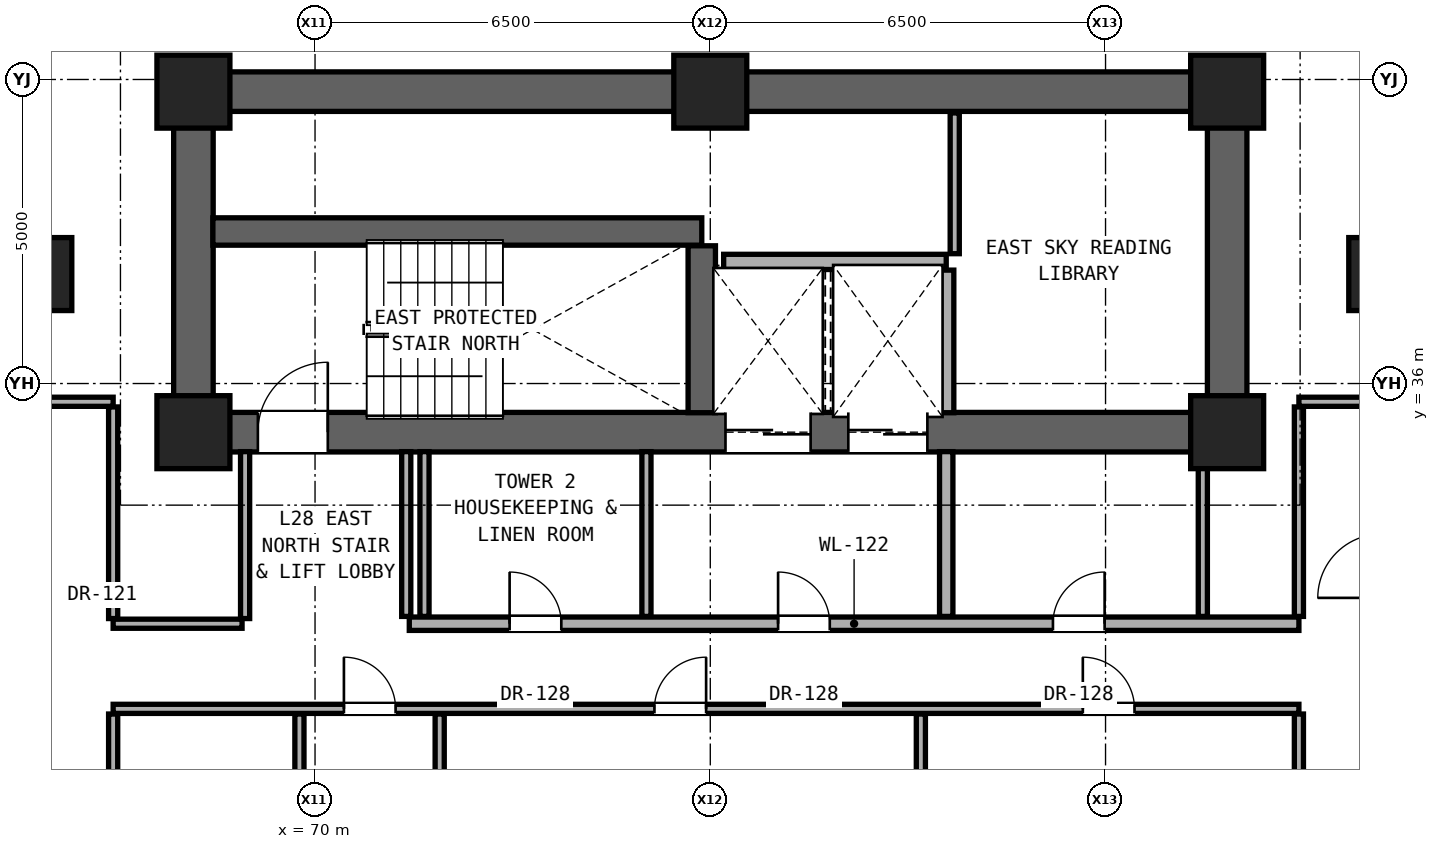
"""IFC4 building model, lengths in metres.
Left out: names, types, materials, properties, quantities, classifications, styles, units other than length and angle.
Written with IfcOpenShell. Run it as: python <this file> out.ifc"""

import sys

from ifc_helpers import new_model, si_unit, direction, frame, frame_2d, origin, origin_2d, place, context, subcontext, project, spatial, rectangle, extrude, element, fill, save


model = new_model("IFC4")
c1 = context("Model", 3, precision=1e-05, world=origin(), true_north=direction((0.0, 1.0)))
c2 = subcontext(c1, "Body", "Model", "MODEL_VIEW")
j1 = project(units=[si_unit("LENGTHUNIT", "METRE"), si_unit("PLANEANGLEUNIT", "RADIAN")], contexts=[c1])
p1 = place(None, origin())
s1 = spatial("IfcSite", under=j1, at=p1, CompositionType="ELEMENT")
p2 = place(p1, origin())
s2 = spatial("IfcBuilding", under=s1, at=p2, CompositionType="ELEMENT")
p3 = place(p2, frame((0.0, 0.0, 101.6)))
s3 = spatial("IfcBuildingStorey", under=s2, at=p3, CompositionType="ELEMENT", Elevation=101.6)
for number, where, z_axis, x_axis in (
    (1, (68.0, 35.2, 0.0), (0.0, 0.0, 1.0), (1.0, 0.0, 0.0)),
    (2, (85.0, 35.2, 0.0), (0.0, 0.0, 1.0), (1.0, 0.0, 0.0)),
    (3, (68.0, 40.8, 0.0), (0.0, 0.0, 1.0), (1.0, 0.0, 0.0)),
    (4, (76.5, 40.8, 0.0), (0.0, 0.0, 1.0), (1.0, 0.0, 0.0)),
    (5, (85.0, 40.8, 0.0), (0.0, 0.0, 1.0), (1.0, 0.0, 0.0)),
):
    element("IfcColumn", number, at=place(p3, frame(where, z_axis=z_axis, x_axis=x_axis)), inside=s3, PredefinedType="COLUMN", context=c2, shape_type="SweptSolid", body=[
        extrude(rectangle(XDim=1.2, YDim=1.2, at=origin_2d()), origin(), (0.0, 0.0, 1.0), 3.3),
    ])
for number, where, z_axis, x_axis in (
    (6, (65.6, 37.8, 0.0), (0.0, 0.0, 1.0), (1.0, 0.0, 0.0)),
    (7, (87.4, 37.8, 0.0), (0.0, 0.0, 1.0), (1.0, 0.0, 0.0)),
):
    element("IfcColumn", number, at=place(p3, frame(where, z_axis=z_axis, x_axis=x_axis)), inside=s3, PredefinedType="PILASTER", context=c2, shape_type="SweptSolid", body=[
        extrude(rectangle(XDim=0.8, YDim=1.2, at=origin_2d()), origin(), (0.0, 0.0, 1.0), 3.3),
    ])
p4 = place(p3, frame((68.0, 40.8, 0.0), z_axis=(0.0, 0.0, 1.0), x_axis=(1.0, 0.0, 0.0)))
e8 = element("IfcWall", 8, at=p4, inside=s3, PredefinedType="SHEAR", context=c2, shape_type="SweptSolid", body=[
    extrude(rectangle(XDim=17.0, YDim=0.65, at=frame_2d((8.5, 0.0))), origin(), (0.0, 0.0, 1.0), 3.08),
])
for number, where, z_axis, x_axis in (
    (9, (68.0, 35.2, 0.0), (0.0, 0.0, 1.0), (0.0, 1.0, 0.0)),
    (10, (85.0, 35.2, 0.0), (0.0, 0.0, 1.0), (0.0, 1.0, 0.0)),
):
    element("IfcWall", number, at=place(p3, frame(where, z_axis=z_axis, x_axis=x_axis)), inside=s3, PredefinedType="SHEAR", context=c2, shape_type="SweptSolid", body=[
        extrude(rectangle(XDim=5.6, YDim=0.65, at=frame_2d((2.8, 0.0))), origin(), (0.0, 0.0, 1.0), 3.08),
    ])
p5 = place(p3, frame((68.0, 35.2, 0.0), z_axis=(0.0, 0.0, 1.0), x_axis=(1.0, 0.0, 0.0)))
e11 = element("IfcWall", 11, at=p5, inside=s3, PredefinedType="SHEAR", context=c2, shape_type="SweptSolid", body=[
    extrude(rectangle(XDim=17.0, YDim=0.65, at=frame_2d((8.5, 0.0))), origin(), (0.0, 0.0, 1.0), 3.08),
])
p6 = place(p5, frame((1.06, 0.0, 0.0)))
e12 = element("IfcOpeningElement", 12, at=p6, cuts=e11, PredefinedType="OPENING", context=c2, shape_type="SweptSolid", body=[
    extrude(rectangle(XDim=1.15, YDim=2.2, at=frame_2d((0.575, 1.1))), frame((0.0, 0.335, 0.0), z_axis=(0.0, -1.0, 0.0), x_axis=(1.0, 0.0, 0.0)), (0.0, 0.0, 1.0), 0.67),
])
p7 = place(p5, frame((8.75, 0.0, 0.0)))
e13 = element("IfcOpeningElement", 13, at=p7, cuts=e11, PredefinedType="OPENING", context=c2, shape_type="SweptSolid", body=[
    extrude(rectangle(XDim=1.4, YDim=2.35, at=frame_2d((0.7, 1.175))), frame((0.0, 0.335, 0.0), z_axis=(0.0, -1.0, 0.0), x_axis=(1.0, 0.0, 0.0)), (0.0, 0.0, 1.0), 0.67),
])
p8 = place(p5, frame((10.77, 0.0, 0.0)))
e14 = element("IfcOpeningElement", 14, at=p8, cuts=e11, PredefinedType="OPENING", context=c2, shape_type="SweptSolid", body=[
    extrude(rectangle(XDim=1.3, YDim=2.3, at=frame_2d((0.65, 1.15))), frame((0.0, 0.335, 0.0), z_axis=(0.0, -1.0, 0.0), x_axis=(1.0, 0.0, 0.0)), (0.0, 0.0, 1.0), 0.67),
])
p9 = place(p3, frame((66.68, 30.65, 0.0), z_axis=(0.0, 0.0, 1.0), x_axis=(1.0, 0.0, 0.0)))
e15 = element("IfcWall", 15, at=p9, inside=s3, PredefinedType="PARTITIONING", context=c2, shape_type="SweptSolid", body=[
    extrude(rectangle(XDim=19.5, YDim=0.15, at=frame_2d((9.75, 0.0))), origin(), (0.0, 0.0, 1.0), 2.145),
])
p10 = place(p9, frame((3.795, 0.0, 0.0)))
e16 = element("IfcOpeningElement", 16, at=p10, cuts=e15, PredefinedType="OPENING", context=c2, shape_type="SweptSolid", body=[
    extrude(rectangle(XDim=0.85, YDim=2.01, at=frame_2d((0.425, 1.005))), frame((0.0, 0.085, 0.0), z_axis=(0.0, -1.0, 0.0), x_axis=(1.0, 0.0, 0.0)), (0.0, 0.0, 1.0), 0.17),
])
p11 = place(p9, frame((8.902, 0.0, 0.0)))
e17 = element("IfcOpeningElement", 17, at=p11, cuts=e15, PredefinedType="OPENING", context=c2, shape_type="SweptSolid", body=[
    extrude(rectangle(XDim=0.85, YDim=2.01, at=frame_2d((0.425, 1.005))), frame((0.0, 0.085, 0.0), z_axis=(0.0, -1.0, 0.0), x_axis=(1.0, 0.0, 0.0)), (0.0, 0.0, 1.0), 0.17),
])
p12 = place(p9, frame((15.947, 0.0, 0.0)))
e18 = element("IfcOpeningElement", 18, at=p12, cuts=e15, PredefinedType="OPENING", context=c2, shape_type="SweptSolid", body=[
    extrude(rectangle(XDim=0.85, YDim=2.01, at=frame_2d((0.425, 1.005))), frame((0.0, 0.085, 0.0), z_axis=(0.0, -1.0, 0.0), x_axis=(1.0, 0.0, 0.0)), (0.0, 0.0, 1.0), 0.17),
])
p13 = place(p3, frame((66.68, 32.05, 0.0), z_axis=(0.0, 0.0, 1.0), x_axis=(1.0, 0.0, 0.0)))
e19 = element("IfcWall", 19, at=p13, inside=s3, PredefinedType="PARTITIONING", context=c2, shape_type="SweptSolid", body=[
    extrude(rectangle(XDim=2.12, YDim=0.15, at=frame_2d((1.06, 0.0))), origin(), (0.0, 0.0, 1.0), 2.145),
])
p14 = place(p3, frame((71.55, 32.05, 0.0), z_axis=(0.0, 0.0, 1.0), x_axis=(1.0, 0.0, 0.0)))
e20 = element("IfcWall", 20, at=p14, inside=s3, PredefinedType="SOLIDWALL", context=c2, shape_type="SweptSolid", body=[
    extrude(rectangle(XDim=14.63, YDim=0.22, at=frame_2d((7.315, 0.0))), origin(), (0.0, 0.0, 1.0), 2.145),
])
p15 = place(p14, frame((6.065, 0.0, 0.0)))
e21 = element("IfcOpeningElement", 21, at=p15, cuts=e20, PredefinedType="OPENING", context=c2, shape_type="SweptSolid", body=[
    extrude(rectangle(XDim=0.85, YDim=2.01, at=frame_2d((0.425, 1.005))), frame((0.0, 0.12, 0.0), z_axis=(0.0, -1.0, 0.0), x_axis=(1.0, 0.0, 0.0)), (0.0, 0.0, 1.0), 0.24),
])
p16 = place(p14, frame((10.585, 0.0, 0.0)))
e22 = element("IfcOpeningElement", 22, at=p16, cuts=e20, PredefinedType="OPENING", context=c2, shape_type="SweptSolid", body=[
    extrude(rectangle(XDim=0.85, YDim=2.01, at=frame_2d((0.425, 1.005))), frame((0.0, 0.12, 0.0), z_axis=(0.0, -1.0, 0.0), x_axis=(1.0, 0.0, 0.0)), (0.0, 0.0, 1.0), 0.24),
])
p17 = place(p14, frame((1.65, 0.0, 0.0)))
e23 = element("IfcOpeningElement", 23, at=p17, cuts=e20, PredefinedType="OPENING", context=c2, shape_type="SweptSolid", body=[
    extrude(rectangle(XDim=0.85, YDim=2.01, at=frame_2d((0.425, 1.005))), frame((0.0, 0.12, 0.0), z_axis=(0.0, -1.0, 0.0), x_axis=(1.0, 0.0, 0.0)), (0.0, 0.0, 1.0), 0.24),
])
p18 = place(p3, frame((65.32, 35.7, 0.0), z_axis=(0.0, 0.0, 1.0), x_axis=(1.0, 0.0, 0.0)))
e24 = element("IfcWall", 24, at=p18, inside=s3, PredefinedType="PARTITIONING", context=c2, shape_type="SweptSolid", body=[
    extrude(rectangle(XDim=1.36, YDim=0.15, at=frame_2d((0.68, 0.0))), origin(), (0.0, 0.0, 1.0), 3.08),
])
p19 = place(p3, frame((86.18, 35.7, 0.0), z_axis=(0.0, 0.0, 1.0), x_axis=(1.0, 0.0, 0.0)))
e25 = element("IfcWall", 25, at=p19, inside=s3, PredefinedType="PARTITIONING", context=c2, shape_type="SweptSolid", body=[
    extrude(rectangle(XDim=1.36, YDim=0.15, at=frame_2d((0.68, 0.0))), origin(), (0.0, 0.0, 1.0), 3.08),
])
p20 = place(p3, frame((76.72, 38.0, 0.0), z_axis=(0.0, 0.0, 1.0), x_axis=(1.0, 0.0, 0.0)))
e26 = element("IfcWall", 26, at=p20, inside=s3, PredefinedType="SOLIDWALL", context=c2, shape_type="SweptSolid", body=[
    extrude(rectangle(XDim=3.66, YDim=0.25, at=frame_2d((1.83, 0.0))), origin(), (0.0, 0.0, 1.0), 3.08),
])
p21 = place(p3, frame((68.32, 38.5, 0.0), z_axis=(0.0, 0.0, 1.0), x_axis=(1.0, 0.0, 0.0)))
e27 = element("IfcWall", 27, at=p21, inside=s3, PredefinedType="SHEAR", context=c2, shape_type="SweptSolid", body=[
    extrude(rectangle(XDim=8.04, YDim=0.45, at=frame_2d((4.02, 0.0))), origin(), (0.0, 0.0, 1.0), 3.08),
])
p22 = place(p3, frame((66.68, 24.935, 0.0), z_axis=(0.0, 0.0, 1.0), x_axis=(0.0, 1.0, 0.0)))
e28 = element("IfcWall", 28, at=p22, inside=s3, PredefinedType="PARTITIONING", context=c2, shape_type="SweptSolid", body=[
    extrude(rectangle(XDim=5.63, YDim=0.15, at=frame_2d((2.815, 0.0))), origin(), (0.0, 0.0, 1.0), 2.299),
])
p23 = place(p22, frame((2.34, 0.0, 0.0)))
e29 = element("IfcOpeningElement", 29, at=p23, cuts=e28, PredefinedType="OPENING", context=c2, shape_type="SweptSolid", body=[
    extrude(rectangle(XDim=0.95, YDim=2.15, at=frame_2d((0.475, 1.075))), frame((0.0, 0.085, 0.0), z_axis=(0.0, -1.0, 0.0), x_axis=(1.0, 0.0, 0.0)), (0.0, 0.0, 1.0), 0.17),
])
p24 = place(p3, frame((66.68, 32.135, 0.0), z_axis=(0.0, 0.0, 1.0), x_axis=(0.0, 1.0, 0.0)))
e30 = element("IfcWall", 30, at=p24, inside=s3, PredefinedType="PARTITIONING", context=c2, shape_type="SweptSolid", body=[
    extrude(rectangle(XDim=3.48, YDim=0.15, at=frame_2d((1.74, 0.0))), origin(), (0.0, 0.0, 1.0), 2.472),
])
p25 = place(p3, frame((68.85, 32.135, 0.0), z_axis=(0.0, 0.0, 1.0), x_axis=(0.0, 1.0, 0.0)))
e31 = element("IfcWall", 31, at=p25, inside=s3, PredefinedType="PARTITIONING", context=c2, shape_type="SweptSolid", body=[
    extrude(rectangle(XDim=2.745, YDim=0.15, at=frame_2d((1.373, 0.0))), origin(), (0.0, 0.0, 1.0), 3.08),
])
p26 = place(p3, frame((69.743, 24.935, 0.0), z_axis=(0.0, 0.0, 1.0), x_axis=(0.0, 1.0, 0.0)))
e32 = element("IfcWall", 32, at=p26, inside=s3, PredefinedType="PARTITIONING", context=c2, shape_type="SweptSolid", body=[
    extrude(rectangle(XDim=5.63, YDim=0.15, at=frame_2d((2.815, 0.0))), origin(), (0.0, 0.0, 1.0), 2.145),
])
for number, where, z_axis, x_axis in (
    (33, (71.5, 32.17, 0.0), (0.0, 0.0, 1.0), (0.0, 1.0, 0.0)),
    (34, (71.8, 32.17, 0.0), (0.0, 0.0, 1.0), (0.0, 1.0, 0.0)),
):
    element("IfcWall", number, at=place(p3, frame(where, z_axis=z_axis, x_axis=x_axis)), inside=s3, PredefinedType="PARTITIONING", context=c2, shape_type="SweptSolid", body=[
        extrude(rectangle(XDim=2.71, YDim=0.15, at=frame_2d((1.355, 0.0))), origin(), (0.0, 0.0, 1.0), 3.08),
    ])
p27 = place(p3, frame((72.05, 26.17, 0.0), z_axis=(0.0, 0.0, 1.0), x_axis=(0.0, 1.0, 0.0)))
e35 = element("IfcWall", 35, at=p27, inside=s3, PredefinedType="PARTITIONING", context=c2, shape_type="SweptSolid", body=[
    extrude(rectangle(XDim=4.395, YDim=0.15, at=frame_2d((2.198, 0.0))), origin(), (0.0, 0.0, 1.0), 2.145),
])
p28 = place(p3, frame((75.45, 32.17, 0.0), z_axis=(0.0, 0.0, 1.0), x_axis=(0.0, 1.0, 0.0)))
e36 = element("IfcWall", 36, at=p28, inside=s3, PredefinedType="PARTITIONING", context=c2, shape_type="SweptSolid", body=[
    extrude(rectangle(XDim=2.71, YDim=0.15, at=frame_2d((1.355, 0.0))), origin(), (0.0, 0.0, 1.0), 3.08),
])
p29 = place(p3, frame((76.36, 35.52, 0.0), z_axis=(0.0, 0.0, 1.0), x_axis=(0.0, 1.0, 0.0)))
e37 = element("IfcWall", 37, at=p29, inside=s3, PredefinedType="SHEAR", context=c2, shape_type="SweptSolid", body=[
    extrude(rectangle(XDim=2.745, YDim=0.45, at=frame_2d((1.373, 0.0))), origin(), (0.0, 0.0, 1.0), 3.08),
])
p30 = place(p3, frame((79.963, 26.17, 0.0), z_axis=(0.0, 0.0, 1.0), x_axis=(0.0, 1.0, 0.0)))
e38 = element("IfcWall", 38, at=p30, inside=s3, PredefinedType="PARTITIONING", context=c2, shape_type="SweptSolid", body=[
    extrude(rectangle(XDim=4.395, YDim=0.15, at=frame_2d((2.198, 0.0))), origin(), (0.0, 0.0, 1.0), 2.145),
])
p31 = place(p3, frame((80.38, 32.17, 0.0), z_axis=(0.0, 0.0, 1.0), x_axis=(0.0, 1.0, 0.0)))
e39 = element("IfcWall", 39, at=p31, inside=s3, PredefinedType="SOLIDWALL", context=c2, shape_type="SweptSolid", body=[
    extrude(rectangle(XDim=2.71, YDim=0.22, at=frame_2d((1.355, 0.0))), origin(), (0.0, 0.0, 1.0), 3.08),
])
p32 = place(p3, frame((80.38, 35.52, 0.0), z_axis=(0.0, 0.0, 1.0), x_axis=(0.0, 1.0, 0.0)))
e40 = element("IfcWall", 40, at=p32, inside=s3, PredefinedType="SOLIDWALL", context=c2, shape_type="SweptSolid", body=[
    extrude(rectangle(XDim=2.345, YDim=0.25, at=frame_2d((1.172, 0.0))), origin(), (0.0, 0.0, 1.0), 3.08),
])
p33 = place(p3, frame((80.52, 38.135, 0.0), z_axis=(0.0, 0.0, 1.0), x_axis=(0.0, 1.0, 0.0)))
e41 = element("IfcWall", 41, at=p33, inside=s3, PredefinedType="PARTITIONING", context=c2, shape_type="SweptSolid", body=[
    extrude(rectangle(XDim=2.315, YDim=0.15, at=frame_2d((1.157, 0.0))), origin(), (0.0, 0.0, 1.0), 3.08),
])
p34 = place(p3, frame((84.6, 32.17, 0.0), z_axis=(0.0, 0.0, 1.0), x_axis=(0.0, 1.0, 0.0)))
e42 = element("IfcWall", 42, at=p34, inside=s3, PredefinedType="PARTITIONING", context=c2, shape_type="SweptSolid", body=[
    extrude(rectangle(XDim=2.71, YDim=0.15, at=frame_2d((1.355, 0.0))), origin(), (0.0, 0.0, 1.0), 3.08),
])
p35 = place(p3, frame((86.18, 26.17, 0.0), z_axis=(0.0, 0.0, 1.0), x_axis=(0.0, 1.0, 0.0)))
e43 = element("IfcWall", 43, at=p35, inside=s3, PredefinedType="PARTITIONING", context=c2, shape_type="SweptSolid", body=[
    extrude(rectangle(XDim=4.395, YDim=0.15, at=frame_2d((2.198, 0.0))), origin(), (0.0, 0.0, 1.0), 2.299),
])
p36 = place(p3, frame((86.18, 32.17, 0.0), z_axis=(0.0, 0.0, 1.0), x_axis=(0.0, 1.0, 0.0)))
e44 = element("IfcWall", 44, at=p36, inside=s3, PredefinedType="PARTITIONING", context=c2, shape_type="SweptSolid", body=[
    extrude(rectangle(XDim=3.445, YDim=0.15, at=frame_2d((1.723, 0.0))), origin(), (0.0, 0.0, 1.0), 2.472),
])
p37 = place(p6, origin())
e45 = element("IfcDoor", 45, at=p37, inside=s3, OperationType="SINGLE_SWING_RIGHT", PredefinedType="DOOR", context=c2, shape_type="SweptSolid", body=[
    extrude(rectangle(XDim=1.15, YDim=2.2, at=frame_2d((0.575, 1.1))), frame((0.0, 0.025, 0.0), z_axis=(0.0, -1.0, 0.0), x_axis=(1.0, 0.0, 0.0)), (0.0, 0.0, 1.0), 0.05),
])
fill(e12, e45)
p38 = place(p15, origin())
e46 = element("IfcDoor", 46, at=p38, inside=s3, OperationType="SINGLE_SWING_LEFT", PredefinedType="DOOR", context=c2, shape_type="SweptSolid", body=[
    extrude(rectangle(XDim=0.85, YDim=2.01, at=frame_2d((0.425, 1.005))), frame((0.0, 0.025, 0.0), z_axis=(0.0, -1.0, 0.0), x_axis=(1.0, 0.0, 0.0)), (0.0, 0.0, 1.0), 0.05),
])
fill(e21, e46)
p39 = place(p16, origin())
e47 = element("IfcDoor", 47, at=p39, inside=s3, OperationType="SINGLE_SWING_RIGHT", PredefinedType="DOOR", context=c2, shape_type="SweptSolid", body=[
    extrude(rectangle(XDim=0.85, YDim=2.01, at=frame_2d((0.425, 1.005))), frame((0.0, 0.025, 0.0), z_axis=(0.0, -1.0, 0.0), x_axis=(1.0, 0.0, 0.0)), (0.0, 0.0, 1.0), 0.05),
])
fill(e22, e47)
p40 = place(p17, origin())
e48 = element("IfcDoor", 48, at=p40, inside=s3, OperationType="SINGLE_SWING_LEFT", PredefinedType="DOOR", context=c2, shape_type="SweptSolid", body=[
    extrude(rectangle(XDim=0.85, YDim=2.01, at=frame_2d((0.425, 1.005))), frame((0.0, 0.025, 0.0), z_axis=(0.0, -1.0, 0.0), x_axis=(1.0, 0.0, 0.0)), (0.0, 0.0, 1.0), 0.05),
])
fill(e23, e48)
p41 = place(p10, origin())
e49 = element("IfcDoor", 49, at=p41, inside=s3, OperationType="SINGLE_SWING_LEFT", PredefinedType="DOOR", context=c2, shape_type="SweptSolid", body=[
    extrude(rectangle(XDim=0.85, YDim=2.01, at=frame_2d((0.425, 1.005))), frame((0.0, 0.025, 0.0), z_axis=(0.0, -1.0, 0.0), x_axis=(1.0, 0.0, 0.0)), (0.0, 0.0, 1.0), 0.05),
])
fill(e16, e49)
p42 = place(p11, origin())
e50 = element("IfcDoor", 50, at=p42, inside=s3, OperationType="SINGLE_SWING_RIGHT", PredefinedType="DOOR", context=c2, shape_type="SweptSolid", body=[
    extrude(rectangle(XDim=0.85, YDim=2.01, at=frame_2d((0.425, 1.005))), frame((0.0, 0.025, 0.0), z_axis=(0.0, -1.0, 0.0), x_axis=(1.0, 0.0, 0.0)), (0.0, 0.0, 1.0), 0.05),
])
fill(e17, e50)
p43 = place(p12, origin())
e51 = element("IfcDoor", 51, at=p43, inside=s3, OperationType="SINGLE_SWING_LEFT", PredefinedType="DOOR", context=c2, shape_type="SweptSolid", body=[
    extrude(rectangle(XDim=0.85, YDim=2.01, at=frame_2d((0.425, 1.005))), frame((0.0, 0.025, 0.0), z_axis=(0.0, -1.0, 0.0), x_axis=(1.0, 0.0, 0.0)), (0.0, 0.0, 1.0), 0.05),
])
fill(e18, e51)
p44 = place(p7, origin())
e52 = element("IfcDoor", 52, at=p44, inside=s3, OperationType="DOUBLE_DOOR_SLIDING", PredefinedType="DOOR", context=c2, shape_type="SweptSolid", body=[
    extrude(rectangle(XDim=1.4, YDim=2.35, at=frame_2d((0.7, 1.175))), frame((0.0, 0.025, 0.0), z_axis=(0.0, -1.0, 0.0), x_axis=(1.0, 0.0, 0.0)), (0.0, 0.0, 1.0), 0.05),
])
fill(e13, e52)
p45 = place(p8, origin())
e53 = element("IfcDoor", 53, at=p45, inside=s3, OperationType="DOUBLE_DOOR_SLIDING", PredefinedType="DOOR", context=c2, shape_type="SweptSolid", body=[
    extrude(rectangle(XDim=1.3, YDim=2.3, at=frame_2d((0.65, 1.15))), frame((0.0, 0.025, 0.0), z_axis=(0.0, -1.0, 0.0), x_axis=(1.0, 0.0, 0.0)), (0.0, 0.0, 1.0), 0.05),
])
fill(e14, e53)
save(model, sys.argv[1])
